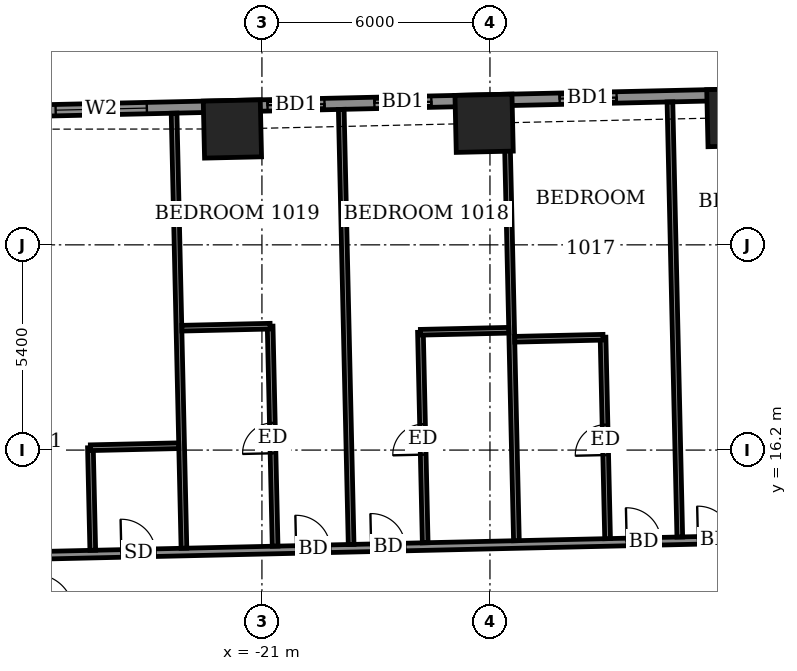
"""IFC4 building model, lengths in metres.
Left out: names, types, materials, properties, quantities, classifications, styles, units other than length and angle.
Written with IfcOpenShell. Run it as: python <this file> out.ifc"""

import sys

from ifc_helpers import new_model, si_unit, direction, frame, frame_2d, origin, origin_2d, place, context, subcontext, project, spatial, rectangle, extrude, element, fill, save


model = new_model("IFC4")
c1 = context("Model", 3, precision=1e-05, world=origin(), true_north=direction((0.0, 1.0)))
c2 = subcontext(c1, "Body", "Model", "MODEL_VIEW")
j1 = project(units=[si_unit("LENGTHUNIT", "METRE"), si_unit("PLANEANGLEUNIT", "RADIAN")], contexts=[c1])
p1 = place(None, origin())
s1 = spatial("IfcSite", under=j1, at=p1, CompositionType="ELEMENT")
p2 = place(p1, origin())
s2 = spatial("IfcBuilding", under=s1, at=p2, CompositionType="ELEMENT")
p3 = place(p2, frame((0.0, 0.0, 44.9)))
s3 = spatial("IfcBuildingStorey", under=s2, at=p3, CompositionType="ELEMENT", Elevation=44.9)
for number, where, z_axis, x_axis in (
    (1, (-8.53, 24.949, -0.55), (0.0, 0.0, 1.0), (-1.0, -0.023, 0.0)),
    (2, (-15.154, 24.799, -0.55), (0.0, 0.0, 1.0), (-1.0, -0.023, 0.0)),
    (3, (-21.777, 24.649, -0.55), (0.0, 0.0, 1.0), (-1.0, -0.023, 0.0)),
):
    element("IfcColumn", number, at=place(p3, frame(where, z_axis=z_axis, x_axis=x_axis)), inside=s3, PredefinedType="COLUMN", context=c2, shape_type="SweptSolid", body=[
        extrude(rectangle(XDim=1.5, YDim=1.5, at=origin_2d()), origin(), (0.0, 0.0, 1.0), 3.6),
    ])
p4 = place(p3, frame((24.423, 26.298, 0.0), z_axis=(0.0, 0.0, 1.0), x_axis=(-0.999742433108, -0.022695097355, 0.0)))
e4 = element("IfcWall", 4, at=p4, inside=s3, PredefinedType="SOLIDWALL", context=c2, shape_type="SweptSolid", body=[
    extrude(rectangle(XDim=52.701, YDim=0.3, at=frame_2d((26.35, 0.0))), origin(), (0.0, 0.0, 1.0), 3.05),
])
p5 = place(p4, frame((2.009, 0.0, 0.0)))
e5 = element("IfcOpeningElement", 5, at=p5, cuts=e4, PredefinedType="OPENING", context=c2, shape_type="SweptSolid", body=[
    extrude(rectangle(XDim=1.5, YDim=2.4, at=frame_2d((0.75, 1.2))), frame((0.0, 0.16, 0.0), z_axis=(0.0, -1.0, 0.0), x_axis=(1.0, 0.0, 0.0)), (0.0, 0.0, 1.0), 0.32),
])
p6 = place(p4, frame((7.337, 0.0, 0.0)))
e6 = element("IfcOpeningElement", 6, at=p6, cuts=e4, PredefinedType="OPENING", context=c2, shape_type="SweptSolid", body=[
    extrude(rectangle(XDim=1.2, YDim=2.4, at=frame_2d((0.6, 1.2))), frame((0.0, 0.16, 0.0), z_axis=(0.0, -1.0, 0.0), x_axis=(1.0, 0.0, 0.0)), (0.0, 0.0, 1.0), 0.32),
])
p7 = place(p4, frame((10.0, 0.0, 0.0)))
e7 = element("IfcOpeningElement", 7, at=p7, cuts=e4, PredefinedType="OPENING", context=c2, shape_type="SweptSolid", body=[
    extrude(rectangle(XDim=1.5, YDim=2.4, at=frame_2d((0.75, 1.2))), frame((0.0, 0.16, 0.0), z_axis=(0.0, -1.0, 0.0), x_axis=(1.0, 0.0, 0.0)), (0.0, 0.0, 1.0), 0.32),
])
p8 = place(p4, frame((14.85, 0.0, 0.0)))
e8 = element("IfcOpeningElement", 8, at=p8, cuts=e4, PredefinedType="OPENING", context=c2, shape_type="SweptSolid", body=[
    extrude(rectangle(XDim=1.5, YDim=2.4, at=frame_2d((0.75, 1.2))), frame((0.0, 0.16, 0.0), z_axis=(0.0, -1.0, 0.0), x_axis=(1.0, 0.0, 0.0)), (0.0, 0.0, 1.0), 0.32),
])
p9 = place(p4, frame((20.638, 0.0, 0.9)))
e9 = element("IfcOpeningElement", 9, at=p9, cuts=e4, PredefinedType="OPENING", context=c2, shape_type="SweptSolid", body=[
    extrude(rectangle(XDim=0.9, YDim=1.5, at=frame_2d((0.45, 0.75))), frame((0.0, 0.16, 0.0), z_axis=(0.0, -1.0, 0.0), x_axis=(1.0, 0.0, 0.0)), (0.0, 0.0, 1.0), 0.32),
])
p10 = place(p4, frame((23.125, 0.0, 0.0)))
e10 = element("IfcOpeningElement", 10, at=p10, cuts=e4, PredefinedType="OPENING", context=c2, shape_type="SweptSolid", body=[
    extrude(rectangle(XDim=1.5, YDim=2.4, at=frame_2d((0.75, 1.2))), frame((0.0, 0.16, 0.0), z_axis=(0.0, -1.0, 0.0), x_axis=(1.0, 0.0, 0.0)), (0.0, 0.0, 1.0), 0.32),
])
p11 = place(p4, frame((27.9, 0.0, 0.0)))
e11 = element("IfcOpeningElement", 11, at=p11, cuts=e4, PredefinedType="OPENING", context=c2, shape_type="SweptSolid", body=[
    extrude(rectangle(XDim=1.5, YDim=2.4, at=frame_2d((0.75, 1.2))), frame((0.0, 0.16, 0.0), z_axis=(0.0, -1.0, 0.0), x_axis=(1.0, 0.0, 0.0)), (0.0, 0.0, 1.0), 0.32),
])
p12 = place(p4, frame((30.862, 0.0, 0.0)))
e12 = element("IfcOpeningElement", 12, at=p12, cuts=e4, PredefinedType="OPENING", context=c2, shape_type="SweptSolid", body=[
    extrude(rectangle(XDim=1.2, YDim=2.4, at=frame_2d((0.6, 1.2))), frame((0.0, 0.16, 0.0), z_axis=(0.0, -1.0, 0.0), x_axis=(1.0, 0.0, 0.0)), (0.0, 0.0, 1.0), 0.32),
])
p13 = place(p4, frame((36.1, 0.0, 0.0)))
e13 = element("IfcOpeningElement", 13, at=p13, cuts=e4, PredefinedType="OPENING", context=c2, shape_type="SweptSolid", body=[
    extrude(rectangle(XDim=1.5, YDim=2.4, at=frame_2d((0.75, 1.2))), frame((0.0, 0.16, 0.0), z_axis=(0.0, -1.0, 0.0), x_axis=(1.0, 0.0, 0.0)), (0.0, 0.0, 1.0), 0.32),
])
p14 = place(p4, frame((40.975, 0.0, 0.0)))
e14 = element("IfcOpeningElement", 14, at=p14, cuts=e4, PredefinedType="OPENING", context=c2, shape_type="SweptSolid", body=[
    extrude(rectangle(XDim=1.5, YDim=2.4, at=frame_2d((0.75, 1.2))), frame((0.0, 0.16, 0.0), z_axis=(0.0, -1.0, 0.0), x_axis=(1.0, 0.0, 0.0)), (0.0, 0.0, 1.0), 0.32),
])
p15 = place(p4, frame((43.788, 0.0, 0.0)))
e15 = element("IfcOpeningElement", 15, at=p15, cuts=e4, PredefinedType="OPENING", context=c2, shape_type="SweptSolid", body=[
    extrude(rectangle(XDim=1.5, YDim=2.4, at=frame_2d((0.75, 1.2))), frame((0.0, 0.16, 0.0), z_axis=(0.0, -1.0, 0.0), x_axis=(1.0, 0.0, 0.0)), (0.0, 0.0, 1.0), 0.32),
])
p16 = place(p4, frame((48.464, 0.0, 0.9)))
e16 = element("IfcOpeningElement", 16, at=p16, cuts=e4, PredefinedType="OPENING", context=c2, shape_type="SweptSolid", body=[
    extrude(rectangle(XDim=2.4, YDim=1.5, at=frame_2d((1.2, 0.75))), frame((0.0, 0.16, 0.0), z_axis=(0.0, -1.0, 0.0), x_axis=(1.0, 0.0, 0.0)), (0.0, 0.0, 1.0), 0.32),
])
p17 = place(p3, frame((-17.249, 26.802, 0.0), z_axis=(0.0, 0.0, 1.0), x_axis=(0.999743094499, 0.022665943652, 0.0)))
e17 = element("IfcWall", 17, at=p17, inside=s3, PredefinedType="USERDEFINED", context=c2, shape_type="SweptSolid", body=[
    extrude(rectangle(XDim=6.0, YDim=0.55, at=frame_2d((3.0, 0.0))), origin(), (0.0, 0.0, 1.0), 0.8),
])
p18 = place(p3, frame((-31.347, 13.329, 0.0), z_axis=(0.0, 0.0, 1.0), x_axis=(0.999742613079, 0.022687168058, 0.0)))
e18 = element("IfcWall", 18, at=p18, inside=s3, PredefinedType="PARTITIONING", context=c2, shape_type="SweptSolid", body=[
    extrude(rectangle(XDim=58.799, YDim=0.2, at=frame_2d((29.399, 0.0))), origin(), (0.0, 0.0, 1.0), 3.05),
])
p19 = place(p18, frame((56.675, 0.0, 0.0)))
e19 = element("IfcOpeningElement", 19, at=p19, cuts=e18, PredefinedType="OPENING", context=c2, shape_type="SweptSolid", body=[
    extrude(rectangle(XDim=1.0, YDim=2.1, at=frame_2d((0.5, 1.05))), frame((0.0, 0.11, 0.0), z_axis=(0.0, -1.0, 0.0), x_axis=(1.0, 0.0, 0.0)), (0.0, 0.0, 1.0), 0.22),
])
p20 = place(p18, frame((52.4, 0.0, 0.0)))
e20 = element("IfcOpeningElement", 20, at=p20, cuts=e18, PredefinedType="OPENING", context=c2, shape_type="SweptSolid", body=[
    extrude(rectangle(XDim=0.9, YDim=2.1, at=frame_2d((0.45, 1.05))), frame((0.0, 0.11, 0.0), z_axis=(0.0, -1.0, 0.0), x_axis=(1.0, 0.0, 0.0)), (0.0, 0.0, 1.0), 0.22),
])
p21 = place(p18, frame((47.7, 0.0, 0.0)))
e21 = element("IfcOpeningElement", 21, at=p21, cuts=e18, PredefinedType="OPENING", context=c2, shape_type="SweptSolid", body=[
    extrude(rectangle(XDim=0.9, YDim=2.1, at=frame_2d((0.45, 1.05))), frame((0.0, 0.11, 0.0), z_axis=(0.0, -1.0, 0.0), x_axis=(1.0, 0.0, 0.0)), (0.0, 0.0, 1.0), 0.22),
])
p22 = place(p18, frame((45.7, 0.0, 0.0)))
e22 = element("IfcOpeningElement", 22, at=p22, cuts=e18, PredefinedType="OPENING", context=c2, shape_type="SweptSolid", body=[
    extrude(rectangle(XDim=0.9, YDim=2.1, at=frame_2d((0.45, 1.05))), frame((0.0, 0.11, 0.0), z_axis=(0.0, -1.0, 0.0), x_axis=(1.0, 0.0, 0.0)), (0.0, 0.0, 1.0), 0.22),
])
p23 = place(p18, frame((38.95, 0.0, 0.0)))
e23 = element("IfcOpeningElement", 23, at=p23, cuts=e18, PredefinedType="OPENING", context=c2, shape_type="SweptSolid", body=[
    extrude(rectangle(XDim=0.9, YDim=2.1, at=frame_2d((0.45, 1.05))), frame((0.0, 0.11, 0.0), z_axis=(0.0, -1.0, 0.0), x_axis=(1.0, 0.0, 0.0)), (0.0, 0.0, 1.0), 0.22),
])
p24 = place(p18, frame((37.05, 0.0, 0.0)))
e24 = element("IfcOpeningElement", 24, at=p24, cuts=e18, PredefinedType="OPENING", context=c2, shape_type="SweptSolid", body=[
    extrude(rectangle(XDim=0.9, YDim=2.1, at=frame_2d((0.45, 1.05))), frame((0.0, 0.11, 0.0), z_axis=(0.0, -1.0, 0.0), x_axis=(1.0, 0.0, 0.0)), (0.0, 0.0, 1.0), 0.22),
])
p25 = place(p18, frame((30.375, 0.0, 0.0)))
e25 = element("IfcOpeningElement", 25, at=p25, cuts=e18, PredefinedType="OPENING", context=c2, shape_type="SweptSolid", body=[
    extrude(rectangle(XDim=0.9, YDim=2.1, at=frame_2d((0.45, 1.05))), frame((0.0, 0.11, 0.0), z_axis=(0.0, -1.0, 0.0), x_axis=(1.0, 0.0, 0.0)), (0.0, 0.0, 1.0), 0.22),
])
p26 = place(p18, frame((28.5, 0.0, 0.0)))
e26 = element("IfcOpeningElement", 26, at=p26, cuts=e18, PredefinedType="OPENING", context=c2, shape_type="SweptSolid", body=[
    extrude(rectangle(XDim=0.9, YDim=2.1, at=frame_2d((0.45, 1.05))), frame((0.0, 0.11, 0.0), z_axis=(0.0, -1.0, 0.0), x_axis=(1.0, 0.0, 0.0)), (0.0, 0.0, 1.0), 0.22),
])
p27 = place(p18, frame((21.825, 0.0, 0.0)))
e27 = element("IfcOpeningElement", 27, at=p27, cuts=e18, PredefinedType="OPENING", context=c2, shape_type="SweptSolid", body=[
    extrude(rectangle(XDim=0.9, YDim=2.1, at=frame_2d((0.45, 1.05))), frame((0.0, 0.11, 0.0), z_axis=(0.0, -1.0, 0.0), x_axis=(1.0, 0.0, 0.0)), (0.0, 0.0, 1.0), 0.22),
])
p28 = place(p18, frame((19.95, 0.0, 0.0)))
e28 = element("IfcOpeningElement", 28, at=p28, cuts=e18, PredefinedType="OPENING", context=c2, shape_type="SweptSolid", body=[
    extrude(rectangle(XDim=0.9, YDim=2.1, at=frame_2d((0.45, 1.05))), frame((0.0, 0.11, 0.0), z_axis=(0.0, -1.0, 0.0), x_axis=(1.0, 0.0, 0.0)), (0.0, 0.0, 1.0), 0.22),
])
p29 = place(p18, frame((13.225, 0.0, 0.0)))
e29 = element("IfcOpeningElement", 29, at=p29, cuts=e18, PredefinedType="OPENING", context=c2, shape_type="SweptSolid", body=[
    extrude(rectangle(XDim=0.9, YDim=2.1, at=frame_2d((0.45, 1.05))), frame((0.0, 0.11, 0.0), z_axis=(0.0, -1.0, 0.0), x_axis=(1.0, 0.0, 0.0)), (0.0, 0.0, 1.0), 0.22),
])
p30 = place(p18, frame((11.25, 0.0, 0.0)))
e30 = element("IfcOpeningElement", 30, at=p30, cuts=e18, PredefinedType="OPENING", context=c2, shape_type="SweptSolid", body=[
    extrude(rectangle(XDim=0.9, YDim=2.1, at=frame_2d((0.45, 1.05))), frame((0.0, 0.11, 0.0), z_axis=(0.0, -1.0, 0.0), x_axis=(1.0, 0.0, 0.0)), (0.0, 0.0, 1.0), 0.22),
])
p31 = place(p18, frame((1.75, 0.0, 0.0)))
e31 = element("IfcOpeningElement", 31, at=p31, cuts=e18, PredefinedType="OPENING", context=c2, shape_type="SweptSolid", body=[
    extrude(rectangle(XDim=1.0, YDim=2.1, at=frame_2d((0.5, 1.05))), frame((0.0, 0.11, 0.0), z_axis=(0.0, -1.0, 0.0), x_axis=(1.0, 0.0, 0.0)), (0.0, 0.0, 1.0), 0.22),
])
p32 = place(p18, frame((6.65, 0.0, 0.0)))
e32 = element("IfcOpeningElement", 32, at=p32, cuts=e18, PredefinedType="OPENING", context=c2, shape_type="SweptSolid", body=[
    extrude(rectangle(XDim=0.9, YDim=2.1, at=frame_2d((0.45, 1.05))), frame((0.0, 0.11, 0.0), z_axis=(0.0, -1.0, 0.0), x_axis=(1.0, 0.0, 0.0)), (0.0, 0.0, 1.0), 0.22),
])
p33 = place(p3, frame((-25.451, 13.563, 0.0), z_axis=(0.0, 0.0, 1.0), x_axis=(-0.022969966847, 0.999736155505, 0.0)))
e33 = element("IfcWall", 33, at=p33, inside=s3, PredefinedType="PARTITIONING", context=c2, shape_type="SweptSolid", body=[
    extrude(rectangle(XDim=2.7, YDim=0.15, at=frame_2d((1.35, 0.0))), origin(), (0.0, 0.0, 1.0), 3.05),
])
p34 = place(p3, frame((-23.052, 13.617, 0.0), z_axis=(0.0, 0.0, 1.0), x_axis=(-0.022708327922, 0.999742132674, 0.0)))
e34 = element("IfcWall", 34, at=p34, inside=s3, PredefinedType="PARTITIONING", context=c2, shape_type="SweptSolid", body=[
    extrude(rectangle(XDim=11.45, YDim=0.15, at=frame_2d((5.725, 0.0))), origin(), (0.0, 0.0, 1.0), 2.55),
])
p35 = place(p3, frame((-20.653, 13.672, 0.0), z_axis=(0.0, 0.0, 1.0), x_axis=(-0.022603579342, 0.999744506462, 0.0)))
e35 = element("IfcWall", 35, at=p35, inside=s3, PredefinedType="PARTITIONING", context=c2, shape_type="SweptSolid", body=[
    extrude(rectangle(XDim=5.789, YDim=0.15, at=frame_2d((2.895, 0.0))), origin(), (0.0, 0.0, 1.0), 3.05),
])
p36 = place(p35, frame((2.445, 0.0, 0.0)))
e36 = element("IfcOpeningElement", 36, at=p36, cuts=e35, PredefinedType="OPENING", context=c2, shape_type="SweptSolid", body=[
    extrude(rectangle(XDim=0.8, YDim=2.1, at=frame_2d((0.4, 1.05))), frame((0.0, 0.085, 0.0), z_axis=(0.0, -1.0, 0.0), x_axis=(1.0, 0.0, 0.0)), (0.0, 0.0, 1.0), 0.17),
])
p37 = place(p3, frame((-18.653, 13.717, 0.0), z_axis=(0.0, 0.0, 1.0), x_axis=(-0.022708327922, 0.999742132674, 0.0)))
e37 = element("IfcWall", 37, at=p37, inside=s3, PredefinedType="PARTITIONING", context=c2, shape_type="SweptSolid", body=[
    extrude(rectangle(XDim=11.45, YDim=0.15, at=frame_2d((5.725, 0.0))), origin(), (0.0, 0.0, 1.0), 2.55),
])
p38 = place(p3, frame((-16.704, 13.761, 0.0), z_axis=(0.0, 0.0, 1.0), x_axis=(-0.022561251624, 0.999745462568, 0.0)))
e38 = element("IfcWall", 38, at=p38, inside=s3, PredefinedType="PARTITIONING", context=c2, shape_type="SweptSolid", body=[
    extrude(rectangle(XDim=5.541, YDim=0.15, at=frame_2d((2.77, 0.0))), origin(), (0.0, 0.0, 1.0), 3.05),
])
p39 = place(p38, frame((2.32, 0.0, 0.0)))
e39 = element("IfcOpeningElement", 39, at=p39, cuts=e38, PredefinedType="OPENING", context=c2, shape_type="SweptSolid", body=[
    extrude(rectangle(XDim=0.8, YDim=2.1, at=frame_2d((0.4, 1.05))), frame((0.0, 0.085, 0.0), z_axis=(0.0, -1.0, 0.0), x_axis=(1.0, 0.0, 0.0)), (0.0, 0.0, 1.0), 0.17),
])
p40 = place(p3, frame((-14.304, 13.816, 0.0), z_axis=(0.0, 0.0, 1.0), x_axis=(-0.022708327922, 0.999742132674, 0.0)))
e40 = element("IfcWall", 40, at=p40, inside=s3, PredefinedType="PARTITIONING", context=c2, shape_type="SweptSolid", body=[
    extrude(rectangle(XDim=11.45, YDim=0.15, at=frame_2d((5.725, 0.0))), origin(), (0.0, 0.0, 1.0), 3.05),
])
p41 = place(p3, frame((-11.905, 13.87, 0.0), z_axis=(0.0, 0.0, 1.0), x_axis=(-0.022616771387, 0.999744208111, 0.0)))
e41 = element("IfcWall", 41, at=p41, inside=s3, PredefinedType="PARTITIONING", context=c2, shape_type="SweptSolid", body=[
    extrude(rectangle(XDim=5.3, YDim=0.15, at=frame_2d((2.65, 0.0))), origin(), (0.0, 0.0, 1.0), 3.05),
])
p42 = place(p41, frame((2.2, 0.0, 0.0)))
e42 = element("IfcOpeningElement", 42, at=p42, cuts=e41, PredefinedType="OPENING", context=c2, shape_type="SweptSolid", body=[
    extrude(rectangle(XDim=0.8, YDim=2.1, at=frame_2d((0.4, 1.05))), frame((0.0, 0.085, 0.0), z_axis=(0.0, -1.0, 0.0), x_axis=(1.0, 0.0, 0.0)), (0.0, 0.0, 1.0), 0.17),
])
p43 = place(p3, frame((-10.005, 13.913, 0.0), z_axis=(0.0, 0.0, 1.0), x_axis=(-0.022706391805, 0.999742176649, 0.0)))
e43 = element("IfcWall", 43, at=p43, inside=s3, PredefinedType="PARTITIONING", context=c2, shape_type="SweptSolid", body=[
    extrude(rectangle(XDim=11.451, YDim=0.15, at=frame_2d((5.726, 0.0))), origin(), (0.0, 0.0, 1.0), 2.55),
])
p44 = place(p3, frame((-25.513, 16.262, 0.0), z_axis=(0.0, 0.0, 1.0), x_axis=(0.999740478815, 0.022781023197, 0.0)))
e44 = element("IfcWall", 44, at=p44, inside=s3, PredefinedType="PARTITIONING", context=c2, shape_type="SweptSolid", body=[
    extrude(rectangle(XDim=2.325, YDim=0.15, at=frame_2d((1.163, 0.0))), origin(), (0.0, 0.0, 1.0), 3.05),
])
for number, where, z_axis, x_axis in (
    (45, (-14.349, 19.116, 0.0), (0.0, 0.0, 1.0), (1.0, 0.023, 0.0)),
    (46, (-16.829, 19.3, 0.0), (0.0, 0.0, 1.0), (1.0, 0.023, 0.0)),
):
    element("IfcWall", number, at=place(p3, frame(where, z_axis=z_axis, x_axis=x_axis)), inside=s3, PredefinedType="PARTITIONING", context=c2, shape_type="SweptSolid", body=[
        extrude(rectangle(XDim=2.325, YDim=0.15, at=frame_2d((1.162, 0.0))), origin(), (0.0, 0.0, 1.0), 3.05),
    ])
p45 = place(p3, frame((-23.108, 19.407, 0.0), z_axis=(0.0, 0.0, 1.0), x_axis=(0.999740260747, 0.02279059109, 0.0)))
e47 = element("IfcWall", 47, at=p45, inside=s3, PredefinedType="PARTITIONING", context=c2, shape_type="SweptSolid", body=[
    extrude(rectangle(XDim=2.324, YDim=0.15, at=frame_2d((1.162, 0.0))), origin(), (0.0, 0.0, 1.0), 3.05),
])
p46 = place(p13, origin())
e48 = element("IfcDoor", 48, at=p46, inside=s3, OperationType="SLIDING_TO_LEFT", PredefinedType="DOOR", context=c2, shape_type="SweptSolid", body=[
    extrude(rectangle(XDim=1.5, YDim=2.4, at=frame_2d((0.75, 1.2))), frame((0.0, 0.025, 0.0), z_axis=(0.0, -1.0, 0.0), x_axis=(1.0, 0.0, 0.0)), (0.0, 0.0, 1.0), 0.05),
])
fill(e13, e48)
p47 = place(p14, origin())
e49 = element("IfcDoor", 49, at=p47, inside=s3, OperationType="SLIDING_TO_LEFT", PredefinedType="DOOR", context=c2, shape_type="SweptSolid", body=[
    extrude(rectangle(XDim=1.5, YDim=2.4, at=frame_2d((0.75, 1.2))), frame((0.0, 0.025, 0.0), z_axis=(0.0, -1.0, 0.0), x_axis=(1.0, 0.0, 0.0)), (0.0, 0.0, 1.0), 0.05),
])
fill(e14, e49)
p48 = place(p15, origin())
e50 = element("IfcDoor", 50, at=p48, inside=s3, OperationType="SLIDING_TO_LEFT", PredefinedType="DOOR", context=c2, shape_type="SweptSolid", body=[
    extrude(rectangle(XDim=1.5, YDim=2.4, at=frame_2d((0.75, 1.2))), frame((0.0, 0.025, 0.0), z_axis=(0.0, -1.0, 0.0), x_axis=(1.0, 0.0, 0.0)), (0.0, 0.0, 1.0), 0.05),
])
fill(e15, e50)
p49 = place(p16, origin())
e51 = element("IfcWindow", 51, at=p49, inside=s3, PartitioningType="DOUBLE_PANEL_VERTICAL", PredefinedType="WINDOW", context=c2, shape_type="SweptSolid", body=[
    extrude(rectangle(XDim=2.4, YDim=1.5, at=frame_2d((1.2, 0.75))), frame((0.0, 0.03, 0.0), z_axis=(0.0, -1.0, 0.0), x_axis=(1.0, 0.0, 0.0)), (0.0, 0.0, 1.0), 0.06),
])
fill(e16, e51)
p50 = place(p27, origin())
e52 = element("IfcDoor", 52, at=p50, inside=s3, OperationType="SINGLE_SWING_RIGHT", PredefinedType="DOOR", context=c2, shape_type="SweptSolid", body=[
    extrude(rectangle(XDim=0.9, YDim=2.1, at=frame_2d((0.45, 1.05))), frame((0.0, 0.025, 0.0), z_axis=(0.0, -1.0, 0.0), x_axis=(1.0, 0.0, 0.0)), (0.0, 0.0, 1.0), 0.05),
])
fill(e27, e52)
p51 = place(p28, origin())
e53 = element("IfcDoor", 53, at=p51, inside=s3, OperationType="SINGLE_SWING_LEFT", PredefinedType="DOOR", context=c2, shape_type="SweptSolid", body=[
    extrude(rectangle(XDim=0.9, YDim=2.1, at=frame_2d((0.45, 1.05))), frame((0.0, 0.025, 0.0), z_axis=(0.0, -1.0, 0.0), x_axis=(1.0, 0.0, 0.0)), (0.0, 0.0, 1.0), 0.05),
])
fill(e28, e53)
p52 = place(p42, origin())
e54 = element("IfcDoor", 54, at=p52, inside=s3, OperationType="SINGLE_SWING_LEFT", PredefinedType="DOOR", context=c2, shape_type="SweptSolid", body=[
    extrude(rectangle(XDim=0.8, YDim=2.1, at=frame_2d((0.4, 1.05))), frame((0.0, 0.025, 0.0), z_axis=(0.0, -1.0, 0.0), x_axis=(1.0, 0.0, 0.0)), (0.0, 0.0, 1.0), 0.05),
])
fill(e42, e54)
p53 = place(p29, origin())
e55 = element("IfcDoor", 55, at=p53, inside=s3, OperationType="SINGLE_SWING_RIGHT", PredefinedType="DOOR", context=c2, shape_type="SweptSolid", body=[
    extrude(rectangle(XDim=0.9, YDim=2.1, at=frame_2d((0.45, 1.05))), frame((0.0, 0.025, 0.0), z_axis=(0.0, -1.0, 0.0), x_axis=(1.0, 0.0, 0.0)), (0.0, 0.0, 1.0), 0.05),
])
fill(e29, e55)
p54 = place(p39, origin())
e56 = element("IfcDoor", 56, at=p54, inside=s3, OperationType="SINGLE_SWING_RIGHT", PredefinedType="DOOR", context=c2, shape_type="SweptSolid", body=[
    extrude(rectangle(XDim=0.8, YDim=2.1, at=frame_2d((0.4, 1.05))), frame((0.0, 0.025, 0.0), z_axis=(0.0, -1.0, 0.0), x_axis=(1.0, 0.0, 0.0)), (0.0, 0.0, 1.0), 0.05),
])
fill(e39, e56)
p55 = place(p30, origin())
e57 = element("IfcDoor", 57, at=p55, inside=s3, OperationType="SINGLE_SWING_LEFT", PredefinedType="DOOR", context=c2, shape_type="SweptSolid", body=[
    extrude(rectangle(XDim=0.9, YDim=2.1, at=frame_2d((0.45, 1.05))), frame((0.0, 0.025, 0.0), z_axis=(0.0, -1.0, 0.0), x_axis=(1.0, 0.0, 0.0)), (0.0, 0.0, 1.0), 0.05),
])
fill(e30, e57)
p56 = place(p36, origin())
e58 = element("IfcDoor", 58, at=p56, inside=s3, OperationType="SINGLE_SWING_LEFT", PredefinedType="DOOR", context=c2, shape_type="SweptSolid", body=[
    extrude(rectangle(XDim=0.8, YDim=2.1, at=frame_2d((0.4, 1.05))), frame((0.0, 0.025, 0.0), z_axis=(0.0, -1.0, 0.0), x_axis=(1.0, 0.0, 0.0)), (0.0, 0.0, 1.0), 0.05),
])
fill(e36, e58)
p57 = place(p32, origin())
e59 = element("IfcDoor", 59, at=p57, inside=s3, OperationType="SINGLE_SWING_LEFT", PredefinedType="DOOR", context=c2, shape_type="SweptSolid", body=[
    extrude(rectangle(XDim=0.9, YDim=2.1, at=frame_2d((0.45, 1.05))), frame((0.0, 0.025, 0.0), z_axis=(0.0, -1.0, 0.0), x_axis=(1.0, 0.0, 0.0)), (0.0, 0.0, 1.0), 0.05),
])
fill(e32, e59)
save(model, sys.argv[1])
